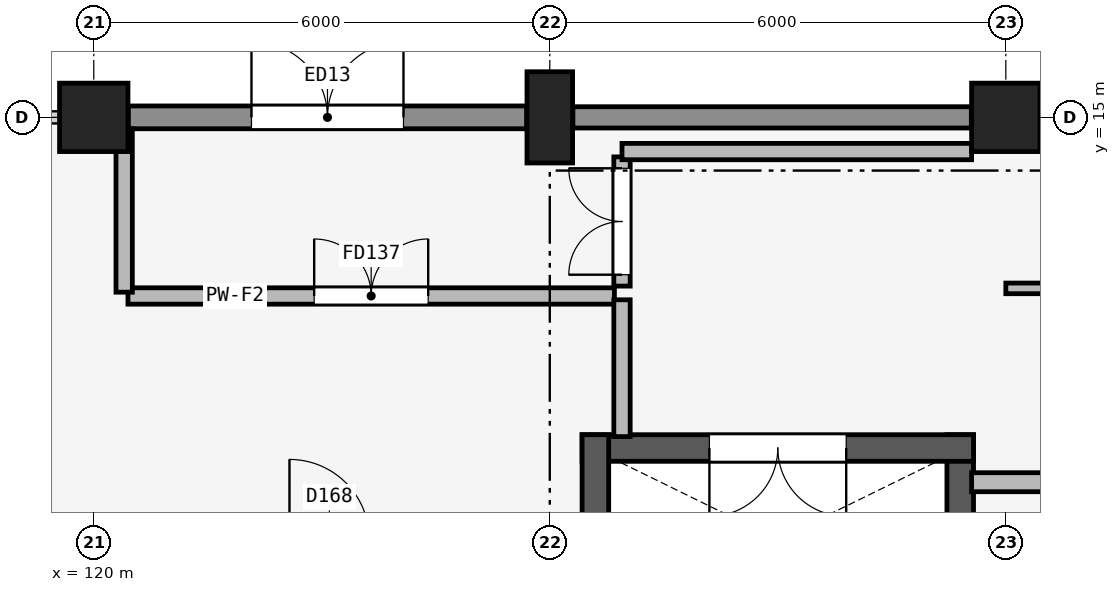
"""IFC4 building model, lengths in metres.
Left out: names, types, materials, properties, quantities, classifications, styles, units other than length and angle.
Written with IfcOpenShell. Run it as: python <this file> out.ifc"""

import sys

from ifc_helpers import new_model, si_unit, direction, frame, frame_2d, origin, origin_2d, place, context, subcontext, project, spatial, rectangle, extrude, element, fill, save


model = new_model("IFC4")
c1 = context("Model", 3, precision=1e-05, world=origin(), true_north=direction((0.0, 1.0)))
c2 = subcontext(c1, "Body", "Model", "MODEL_VIEW")
j1 = project(units=[si_unit("LENGTHUNIT", "METRE"), si_unit("PLANEANGLEUNIT", "RADIAN")], contexts=[c1])
p1 = place(None, origin())
s1 = spatial("IfcSite", under=j1, at=p1, CompositionType="ELEMENT")
p2 = place(p1, origin())
s2 = spatial("IfcBuilding", under=s1, at=p2, CompositionType="ELEMENT")
p3 = place(p2, origin())
s3 = spatial("IfcBuildingStorey", under=s2, at=p3, CompositionType="ELEMENT", Elevation=0.0)
p4 = place(p3, frame((120.0, 15.0, 0.0), z_axis=(0.0, 0.0, 1.0), x_axis=(1.0, 0.0, 0.0)))
e1 = element("IfcColumn", 1, at=p4, inside=s3, PredefinedType="COLUMN", context=c2, shape_type="SweptSolid", body=[
    extrude(rectangle(XDim=0.9, YDim=0.9, at=origin_2d()), origin(), (0.0, 0.0, 1.0), 4.8),
])
p5 = place(p3, frame((126.0, 15.0, 0.0), z_axis=(0.0, 0.0, 1.0), x_axis=(1.0, 0.0, 0.0)))
e2 = element("IfcColumn", 2, at=p5, inside=s3, PredefinedType="COLUMN", context=c2, shape_type="SweptSolid", body=[
    extrude(rectangle(XDim=0.6, YDim=1.2, at=origin_2d()), origin(), (0.0, 0.0, 1.0), 4.8),
])
p6 = place(p3, frame((132.0, 15.0, 0.0), z_axis=(0.0, 0.0, 1.0), x_axis=(1.0, 0.0, 0.0)))
e3 = element("IfcColumn", 3, at=p6, inside=s3, PredefinedType="COLUMN", context=c2, shape_type="SweptSolid", body=[
    extrude(rectangle(XDim=0.9, YDim=0.9, at=origin_2d()), origin(), (0.0, 0.0, 1.0), 4.8),
])
p7 = place(p3, frame((120.454, 15.0, 0.0), z_axis=(0.0, 0.0, 1.0), x_axis=(1.0, 0.0, 0.0)))
e4 = element("IfcWall", 4, at=p7, inside=s3, PredefinedType="SOLIDWALL", context=c2, shape_type="SweptSolid", body=[
    extrude(rectangle(XDim=5.242, YDim=0.3, at=frame_2d((2.621, 0.0))), origin(), (0.0, 0.0, 1.0), 3.94),
])
p8 = place(p7, frame((1.621, 0.0, 0.0)))
e5 = element("IfcOpeningElement", 5, at=p8, cuts=e4, PredefinedType="OPENING", context=c2, shape_type="SweptSolid", body=[
    extrude(rectangle(XDim=2.0, YDim=2.4, at=frame_2d((1.0, 1.2))), frame((0.0, 0.16, 0.0), z_axis=(0.0, -1.0, 0.0), x_axis=(1.0, 0.0, 0.0)), (0.0, 0.0, 1.0), 0.32),
])
p9 = place(p3, frame((126.304, 15.0, 0.0), z_axis=(0.0, 0.0, 1.0), x_axis=(1.0, 0.0, 0.0)))
e6 = element("IfcWall", 6, at=p9, inside=s3, PredefinedType="SOLIDWALL", context=c2, shape_type="SweptSolid", body=[
    extrude(rectangle(XDim=5.242, YDim=0.28, at=frame_2d((2.621, 0.0))), origin(), (0.0, 0.0, 1.0), 4.04),
])
p10 = place(p3, frame((131.4, 1.075, 0.0), z_axis=(0.0, 0.0, 1.0), x_axis=(0.0, 1.0, 0.0)))
e7 = element("IfcWall", 7, at=p10, inside=s3, PredefinedType="SHEAR", context=c2, shape_type="SweptSolid", body=[
    extrude(rectangle(XDim=9.75, YDim=0.35, at=frame_2d((4.875, 0.0))), origin(), (0.0, 0.0, 1.0), 4.66),
])
p11 = place(p3, frame((131.575, 10.65, 0.0), z_axis=(0.0, 0.0, 1.0), x_axis=(-1.0, 0.0, 0.0)))
e8 = element("IfcWall", 8, at=p11, inside=s3, PredefinedType="SHEAR", context=c2, shape_type="SweptSolid", body=[
    extrude(rectangle(XDim=5.15, YDim=0.35, at=frame_2d((2.575, 0.0))), origin(), (0.0, 0.0, 1.0), 4.66),
])
p12 = place(p11, frame((1.675, 0.0, 0.0)))
e9 = element("IfcOpeningElement", 9, at=p12, cuts=e8, PredefinedType="OPENING", context=c2, shape_type="SweptSolid", body=[
    extrude(rectangle(XDim=1.8, YDim=2.2, at=frame_2d((0.9, 1.1))), frame((0.0, 0.185, 0.0), z_axis=(0.0, -1.0, 0.0), x_axis=(1.0, 0.0, 0.0)), (0.0, 0.0, 1.0), 0.37),
])
p13 = place(p3, frame((126.6, 10.825, 0.0), z_axis=(0.0, 0.0, 1.0), x_axis=(0.0, -1.0, 0.0)))
e10 = element("IfcWall", 10, at=p13, inside=s3, PredefinedType="SHEAR", context=c2, shape_type="SweptSolid", body=[
    extrude(rectangle(XDim=9.75, YDim=0.35, at=frame_2d((4.875, 0.0))), origin(), (0.0, 0.0, 1.0), 4.66),
])
p14 = place(p3, frame((126.95, 12.78, 0.0), z_axis=(0.0, 0.0, 1.0), x_axis=(0.0, 1.0, 0.0)))
e11 = element("IfcWall", 11, at=p14, inside=s3, PredefinedType="PARTITIONING", context=c2, shape_type="SweptSolid", body=[
    extrude(rectangle(XDim=1.7, YDim=0.215, at=frame_2d((0.85, 0.0))), origin(), (0.0, 0.0, 1.0), 4.49),
])
p15 = place(p14, frame((0.15, 0.0, 0.0)))
e12 = element("IfcOpeningElement", 12, at=p15, cuts=e11, PredefinedType="OPENING", context=c2, shape_type="SweptSolid", body=[
    extrude(rectangle(XDim=1.4, YDim=2.2, at=frame_2d((0.7, 1.1))), frame((0.0, 0.117, 0.0), z_axis=(0.0, -1.0, 0.0), x_axis=(1.0, 0.0, 0.0)), (0.0, 0.0, 1.0), 0.235),
])
p16 = place(p3, frame((131.55, 10.2, 0.0), z_axis=(0.0, 0.0, 1.0), x_axis=(1.0, 0.0, 0.0)))
e13 = element("IfcWall", 13, at=p16, inside=s3, PredefinedType="PARTITIONING", context=c2, shape_type="SweptSolid", body=[
    extrude(rectangle(XDim=5.65, YDim=0.25, at=frame_2d((2.825, 0.0))), origin(), (0.0, 0.0, 1.0), 4.09),
])
p17 = place(p16, frame((2.075, 0.0, 0.0)))
e14 = element("IfcOpeningElement", 14, at=p17, cuts=e13, PredefinedType="OPENING", context=c2, shape_type="SweptSolid", body=[
    extrude(rectangle(XDim=1.5, YDim=2.15, at=frame_2d((0.75, 1.075))), frame((0.0, 0.135, 0.0), z_axis=(0.0, -1.0, 0.0), x_axis=(1.0, 0.0, 0.0)), (0.0, 0.0, 1.0), 0.27),
])
p18 = place(p3, frame((120.45, 12.65, 0.0), z_axis=(0.0, 0.0, 1.0), x_axis=(1.0, 0.0, 0.0)))
e15 = element("IfcWall", 15, at=p18, inside=s3, PredefinedType="PARTITIONING", context=c2, shape_type="SweptSolid", body=[
    extrude(rectangle(XDim=6.4, YDim=0.215, at=frame_2d((3.2, 0.0))), origin(), (0.0, 0.0, 1.0), 4.09),
])
p19 = place(p18, frame((2.45, 0.0, 0.0)))
e16 = element("IfcOpeningElement", 16, at=p19, cuts=e15, PredefinedType="OPENING", context=c2, shape_type="SweptSolid", body=[
    extrude(rectangle(XDim=1.5, YDim=2.15, at=frame_2d((0.75, 1.075))), frame((0.0, 0.117, 0.0), z_axis=(0.0, -1.0, 0.0), x_axis=(1.0, 0.0, 0.0)), (0.0, 0.0, 1.0), 0.235),
])
p20 = place(p3, frame((126.95, 10.8, 0.0), z_axis=(0.0, 0.0, 1.0), x_axis=(0.0, 1.0, 0.0)))
e17 = element("IfcWall", 17, at=p20, inside=s3, PredefinedType="PARTITIONING", context=c2, shape_type="SweptSolid", body=[
    extrude(rectangle(XDim=1.8, YDim=0.215, at=frame_2d((0.9, 0.0))), origin(), (0.0, 0.0, 1.0), 4.49),
])
p21 = place(p3, frame((120.4, 12.7, 0.0), z_axis=(0.0, 0.0, 1.0), x_axis=(0.0, 1.0, 0.0)))
e18 = element("IfcWall", 18, at=p21, inside=s3, PredefinedType="PARTITIONING", context=c2, shape_type="SweptSolid", body=[
    extrude(rectangle(XDim=2.15, YDim=0.215, at=frame_2d((1.075, 0.0))), origin(), (0.0, 0.0, 1.0), 3.94),
])
p22 = place(p3, frame((126.95, 14.55, 0.0), z_axis=(0.0, 0.0, 1.0), x_axis=(1.0, 0.0, 0.0)))
e19 = element("IfcWall", 19, at=p22, inside=s3, PredefinedType="PARTITIONING", context=c2, shape_type="SweptSolid", body=[
    extrude(rectangle(XDim=4.6, YDim=0.215, at=frame_2d((2.3, 0.0))), origin(), (0.0, 0.0, 1.0), 4.49),
])
p23 = place(p3, frame((144.1, 12.75, 0.0), z_axis=(0.0, 0.0, 1.0), x_axis=(-1.0, 0.0, 0.0)))
e20 = element("IfcWall", 20, at=p23, inside=s3, PredefinedType="PARTITIONING", context=c2, shape_type="SweptSolid", body=[
    extrude(rectangle(XDim=12.1, YDim=0.14, at=frame_2d((6.05, 0.0))), origin(), (0.0, 0.0, 1.0), 4.09),
])
p24 = place(p23, frame((6.625, 0.0, 0.0)))
e21 = element("IfcOpeningElement", 21, at=p24, cuts=e20, PredefinedType="OPENING", context=c2, shape_type="SweptSolid", body=[
    extrude(rectangle(XDim=1.55, YDim=2.2, at=frame_2d((0.775, 1.1))), frame((0.0, 0.08, 0.0), z_axis=(0.0, -1.0, 0.0), x_axis=(1.0, 0.0, 0.0)), (0.0, 0.0, 1.0), 0.16),
])
p25 = place(p23, frame((8.825, 0.0, 0.9)))
e22 = element("IfcOpeningElement", 22, at=p25, cuts=e20, PredefinedType="OPENING", context=c2, shape_type="SweptSolid", body=[
    extrude(rectangle(XDim=2.2, YDim=1.4, at=frame_2d((1.1, 0.7))), frame((0.0, 0.08, 0.0), z_axis=(0.0, -1.0, 0.0), x_axis=(1.0, 0.0, 0.0)), (0.0, 0.0, 1.0), 0.16),
])
p26 = place(p8, origin())
e23 = element("IfcDoor", 23, at=p26, inside=s3, OperationType="DOUBLE_DOOR_SINGLE_SWING", PredefinedType="DOOR", context=c2, shape_type="SweptSolid", body=[
    extrude(rectangle(XDim=2.0, YDim=2.4, at=frame_2d((1.0, 1.2))), frame((0.0, 0.025, 0.0), z_axis=(0.0, -1.0, 0.0), x_axis=(1.0, 0.0, 0.0)), (0.0, 0.0, 1.0), 0.05),
])
fill(e5, e23)
p27 = place(p12, origin())
e24 = element("IfcDoor", 24, at=p27, inside=s3, OperationType="DOUBLE_DOOR_SINGLE_SWING", PredefinedType="DOOR", context=c2, shape_type="SweptSolid", body=[
    extrude(rectangle(XDim=1.8, YDim=2.2, at=frame_2d((0.9, 1.1))), frame((0.0, 0.025, 0.0), z_axis=(0.0, -1.0, 0.0), x_axis=(1.0, 0.0, 0.0)), (0.0, 0.0, 1.0), 0.05),
])
fill(e9, e24)
p28 = place(p15, origin())
e25 = element("IfcDoor", 25, at=p28, inside=s3, OperationType="DOUBLE_DOOR_SINGLE_SWING", PredefinedType="DOOR", context=c2, shape_type="SweptSolid", body=[
    extrude(rectangle(XDim=1.4, YDim=2.2, at=frame_2d((0.7, 1.1))), frame((0.0, 0.025, 0.0), z_axis=(0.0, -1.0, 0.0), x_axis=(1.0, 0.0, 0.0)), (0.0, 0.0, 1.0), 0.05),
])
fill(e12, e25)
p29 = place(p19, origin())
e26 = element("IfcDoor", 26, at=p29, inside=s3, OperationType="DOUBLE_DOOR_SINGLE_SWING", PredefinedType="DOOR", context=c2, shape_type="SweptSolid", body=[
    extrude(rectangle(XDim=1.5, YDim=2.15, at=frame_2d((0.75, 1.075))), frame((0.0, 0.025, 0.0), z_axis=(0.0, -1.0, 0.0), x_axis=(1.0, 0.0, 0.0)), (0.0, 0.0, 1.0), 0.05),
])
fill(e16, e26)
save(model, sys.argv[1])
